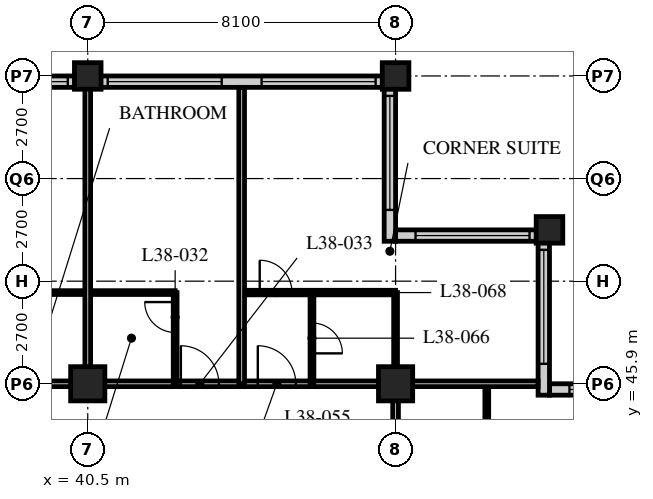
"""IFC4 building model, lengths in metres.
Left out: names, types, materials, properties, quantities, classifications, styles, units other than length and angle.
Written with IfcOpenShell. Run it as: python <this file> out.ifc"""

import sys

from ifc_helpers import new_model, si_unit, direction, frame, frame_2d, origin, origin_2d, place, context, subcontext, project, spatial, rectangle, hollow_rectangle, extrude, element, fill, save


model = new_model("IFC4")
c1 = context("Model", 3, precision=1e-05, world=origin(), true_north=direction((0.0, 1.0)))
c2 = subcontext(c1, "Body", "Model", "MODEL_VIEW")
j1 = project(units=[si_unit("LENGTHUNIT", "METRE"), si_unit("PLANEANGLEUNIT", "RADIAN")], contexts=[c1])
p1 = place(None, origin())
s1 = spatial("IfcSite", under=j1, at=p1, CompositionType="ELEMENT")
p2 = place(p1, origin())
s2 = spatial("IfcBuilding", under=s1, at=p2, CompositionType="ELEMENT")
p3 = place(p2, frame((0.0, 0.0, 147.6)))
s3 = spatial("IfcBuildingStorey", under=s2, at=p3, CompositionType="ELEMENT", Elevation=147.6)
p4 = place(p3, frame((40.5, 45.9, 0.0), z_axis=(0.0, 0.0, 1.0), x_axis=(1.0, 0.0, 0.0)))
e1 = element("IfcColumn", 1, at=p4, inside=s3, PredefinedType="COLUMN", context=c2, shape_type="SweptSolid", body=[
    extrude(hollow_rectangle(XDim=0.9, YDim=0.9, WallThickness=0.1, at=origin_2d()), origin(), (0.0, 0.0, 1.0), 3.4),
])
p5 = place(p3, frame((40.5, 54.0, 0.0), z_axis=(0.0, 0.0, 1.0), x_axis=(1.0, 0.0, 0.0)))
e2 = element("IfcColumn", 2, at=p5, inside=s3, PredefinedType="COLUMN", context=c2, shape_type="SweptSolid", body=[
    extrude(hollow_rectangle(XDim=0.7, YDim=0.7, WallThickness=0.07, at=origin_2d()), origin(), (0.0, 0.0, 1.0), 3.4),
])
p6 = place(p3, frame((48.6, 45.9, 0.0), z_axis=(0.0, 0.0, 1.0), x_axis=(1.0, 0.0, 0.0)))
e3 = element("IfcColumn", 3, at=p6, inside=s3, PredefinedType="COLUMN", context=c2, shape_type="SweptSolid", body=[
    extrude(hollow_rectangle(XDim=0.9, YDim=0.9, WallThickness=0.1, at=origin_2d()), origin(), (0.0, 0.0, 1.0), 3.4),
])
for number, where, z_axis, x_axis in (
    (4, (48.6, 54.0, 0.0), (0.0, 0.0, 1.0), (1.0, 0.0, 0.0)),
    (5, (52.65, 49.95, 0.0), (0.0, 0.0, 1.0), (1.0, 0.0, 0.0)),
):
    element("IfcColumn", number, at=place(p3, frame(where, z_axis=z_axis, x_axis=x_axis)), inside=s3, PredefinedType="COLUMN", context=c2, shape_type="SweptSolid", body=[
        extrude(hollow_rectangle(XDim=0.7, YDim=0.7, WallThickness=0.07, at=origin_2d()), origin(), (0.0, 0.0, 1.0), 3.4),
    ])
p7 = place(p3, frame((56.4, 45.75, 0.0), z_axis=(0.0, 0.0, 1.0), x_axis=(-1.0, 0.0, 0.0)))
e6 = element("IfcWall", 6, at=p7, inside=s3, PredefinedType="SOLIDWALL", context=c2, shape_type="SweptSolid", body=[
    extrude(rectangle(XDim=3.75, YDim=0.3, at=frame_2d((1.875, 0.0))), origin(), (0.0, 0.0, 1.0), 3.19),
])
p8 = place(p7, frame((0.225, 0.0, 0.9)))
e7 = element("IfcOpeningElement", 7, at=p8, cuts=e6, PredefinedType="OPENING", context=c2, shape_type="SweptSolid", body=[
    extrude(rectangle(XDim=3.0, YDim=1.4, at=frame_2d((1.5, 0.7))), frame((0.0, 0.16, 0.0), z_axis=(0.0, -1.0, 0.0), x_axis=(1.0, 0.0, 0.0)), (0.0, 0.0, 1.0), 0.32),
])
p9 = place(p3, frame((52.5, 45.6, 0.0), z_axis=(0.0, 0.0, 1.0), x_axis=(0.0, 1.0, 0.0)))
e8 = element("IfcWall", 8, at=p9, inside=s3, PredefinedType="SOLIDWALL", context=c2, shape_type="SweptSolid", body=[
    extrude(rectangle(XDim=4.35, YDim=0.3, at=frame_2d((2.175, 0.0))), origin(), (0.0, 0.0, 1.0), 3.19),
])
p10 = place(p9, frame((0.825, 0.0, 0.9)))
e9 = element("IfcOpeningElement", 9, at=p10, cuts=e8, PredefinedType="OPENING", context=c2, shape_type="SweptSolid", body=[
    extrude(rectangle(XDim=3.0, YDim=1.4, at=frame_2d((1.5, 0.7))), frame((0.0, 0.16, 0.0), z_axis=(0.0, -1.0, 0.0), x_axis=(1.0, 0.0, 0.0)), (0.0, 0.0, 1.0), 0.32),
])
p11 = place(p3, frame((52.35, 49.8, 0.0), z_axis=(0.0, 0.0, 1.0), x_axis=(-1.0, 0.0, 0.0)))
e10 = element("IfcWall", 10, at=p11, inside=s3, PredefinedType="SOLIDWALL", context=c2, shape_type="SweptSolid", body=[
    extrude(rectangle(XDim=3.75, YDim=0.3, at=frame_2d((1.875, 0.0))), origin(), (0.0, 0.0, 1.0), 3.19),
])
p12 = place(p11, frame((0.225, 0.0, 0.9)))
e11 = element("IfcOpeningElement", 11, at=p12, cuts=e10, PredefinedType="OPENING", context=c2, shape_type="SweptSolid", body=[
    extrude(rectangle(XDim=3.0, YDim=1.4, at=frame_2d((1.5, 0.7))), frame((0.0, 0.16, 0.0), z_axis=(0.0, -1.0, 0.0), x_axis=(1.0, 0.0, 0.0)), (0.0, 0.0, 1.0), 0.32),
])
p13 = place(p3, frame((48.45, 49.65, 0.0), z_axis=(0.0, 0.0, 1.0), x_axis=(0.0, 1.0, 0.0)))
e12 = element("IfcWall", 12, at=p13, inside=s3, PredefinedType="SOLIDWALL", context=c2, shape_type="SweptSolid", body=[
    extrude(rectangle(XDim=4.35, YDim=0.3, at=frame_2d((2.175, 0.0))), origin(), (0.0, 0.0, 1.0), 3.19),
])
p14 = place(p13, frame((0.825, 0.0, 0.9)))
e13 = element("IfcOpeningElement", 13, at=p14, cuts=e12, PredefinedType="OPENING", context=c2, shape_type="SweptSolid", body=[
    extrude(rectangle(XDim=3.0, YDim=1.4, at=frame_2d((1.5, 0.7))), frame((0.0, 0.16, 0.0), z_axis=(0.0, -1.0, 0.0), x_axis=(1.0, 0.0, 0.0)), (0.0, 0.0, 1.0), 0.32),
])
p15 = place(p3, frame((48.3, 53.85, 0.0), z_axis=(0.0, 0.0, 1.0), x_axis=(-1.0, 0.0, 0.0)))
e14 = element("IfcWall", 14, at=p15, inside=s3, PredefinedType="SOLIDWALL", context=c2, shape_type="SweptSolid", body=[
    extrude(rectangle(XDim=40.2, YDim=0.3, at=frame_2d((20.1, 0.0))), origin(), (0.0, 0.0, 1.0), 3.19),
])
p16 = place(p15, frame((0.225, 0.0, 0.9)))
e15 = element("IfcOpeningElement", 15, at=p16, cuts=e14, PredefinedType="OPENING", context=c2, shape_type="SweptSolid", body=[
    extrude(rectangle(XDim=3.0, YDim=1.4, at=frame_2d((1.5, 0.7))), frame((0.0, 0.16, 0.0), z_axis=(0.0, -1.0, 0.0), x_axis=(1.0, 0.0, 0.0)), (0.0, 0.0, 1.0), 0.32),
])
p17 = place(p15, frame((4.275, 0.0, 0.9)))
e16 = element("IfcOpeningElement", 16, at=p17, cuts=e14, PredefinedType="OPENING", context=c2, shape_type="SweptSolid", body=[
    extrude(rectangle(XDim=3.0, YDim=1.4, at=frame_2d((1.5, 0.7))), frame((0.0, 0.16, 0.0), z_axis=(0.0, -1.0, 0.0), x_axis=(1.0, 0.0, 0.0)), (0.0, 0.0, 1.0), 0.32),
])
p18 = place(p15, frame((8.325, 0.0, 0.9)))
e17 = element("IfcOpeningElement", 17, at=p18, cuts=e14, PredefinedType="OPENING", context=c2, shape_type="SweptSolid", body=[
    extrude(rectangle(XDim=3.0, YDim=1.4, at=frame_2d((1.5, 0.7))), frame((0.0, 0.16, 0.0), z_axis=(0.0, -1.0, 0.0), x_axis=(1.0, 0.0, 0.0)), (0.0, 0.0, 1.0), 0.32),
])
p19 = place(p15, frame((12.375, 0.0, 0.9)))
e18 = element("IfcOpeningElement", 18, at=p19, cuts=e14, PredefinedType="OPENING", context=c2, shape_type="SweptSolid", body=[
    extrude(rectangle(XDim=3.0, YDim=1.4, at=frame_2d((1.5, 0.7))), frame((0.0, 0.16, 0.0), z_axis=(0.0, -1.0, 0.0), x_axis=(1.0, 0.0, 0.0)), (0.0, 0.0, 1.0), 0.32),
])
p20 = place(p15, frame((16.425, 0.0, 0.9)))
e19 = element("IfcOpeningElement", 19, at=p20, cuts=e14, PredefinedType="OPENING", context=c2, shape_type="SweptSolid", body=[
    extrude(rectangle(XDim=3.0, YDim=1.4, at=frame_2d((1.5, 0.7))), frame((0.0, 0.16, 0.0), z_axis=(0.0, -1.0, 0.0), x_axis=(1.0, 0.0, 0.0)), (0.0, 0.0, 1.0), 0.32),
])
p21 = place(p15, frame((20.475, 0.0, 0.9)))
e20 = element("IfcOpeningElement", 20, at=p21, cuts=e14, PredefinedType="OPENING", context=c2, shape_type="SweptSolid", body=[
    extrude(rectangle(XDim=3.0, YDim=1.4, at=frame_2d((1.5, 0.7))), frame((0.0, 0.16, 0.0), z_axis=(0.0, -1.0, 0.0), x_axis=(1.0, 0.0, 0.0)), (0.0, 0.0, 1.0), 0.32),
])
p22 = place(p15, frame((24.525, 0.0, 0.9)))
e21 = element("IfcOpeningElement", 21, at=p22, cuts=e14, PredefinedType="OPENING", context=c2, shape_type="SweptSolid", body=[
    extrude(rectangle(XDim=3.0, YDim=1.4, at=frame_2d((1.5, 0.7))), frame((0.0, 0.16, 0.0), z_axis=(0.0, -1.0, 0.0), x_axis=(1.0, 0.0, 0.0)), (0.0, 0.0, 1.0), 0.32),
])
p23 = place(p15, frame((28.575, 0.0, 0.9)))
e22 = element("IfcOpeningElement", 22, at=p23, cuts=e14, PredefinedType="OPENING", context=c2, shape_type="SweptSolid", body=[
    extrude(rectangle(XDim=3.0, YDim=1.4, at=frame_2d((1.5, 0.7))), frame((0.0, 0.16, 0.0), z_axis=(0.0, -1.0, 0.0), x_axis=(1.0, 0.0, 0.0)), (0.0, 0.0, 1.0), 0.32),
])
p24 = place(p15, frame((32.625, 0.0, 0.9)))
e23 = element("IfcOpeningElement", 23, at=p24, cuts=e14, PredefinedType="OPENING", context=c2, shape_type="SweptSolid", body=[
    extrude(rectangle(XDim=3.0, YDim=1.4, at=frame_2d((1.5, 0.7))), frame((0.0, 0.16, 0.0), z_axis=(0.0, -1.0, 0.0), x_axis=(1.0, 0.0, 0.0)), (0.0, 0.0, 1.0), 0.32),
])
p25 = place(p15, frame((36.675, 0.0, 0.9)))
e24 = element("IfcOpeningElement", 24, at=p25, cuts=e14, PredefinedType="OPENING", context=c2, shape_type="SweptSolid", body=[
    extrude(rectangle(XDim=3.0, YDim=1.4, at=frame_2d((1.5, 0.7))), frame((0.0, 0.16, 0.0), z_axis=(0.0, -1.0, 0.0), x_axis=(1.0, 0.0, 0.0)), (0.0, 0.0, 1.0), 0.32),
])
p26 = place(p3, frame((12.15, 45.9, 0.0), z_axis=(0.0, 0.0, 1.0), x_axis=(1.0, 0.0, 0.0)))
e25 = element("IfcWall", 25, at=p26, inside=s3, PredefinedType="PARTITIONING", context=c2, shape_type="SweptSolid", body=[
    extrude(rectangle(XDim=36.45, YDim=0.15, at=frame_2d((18.225, 0.0))), origin(), (0.0, 0.0, 1.0), 2.42),
])
p27 = place(p26, frame((9.225, 0.0, 0.0)))
e26 = element("IfcOpeningElement", 26, at=p27, cuts=e25, PredefinedType="OPENING", context=c2, shape_type="SweptSolid", body=[
    extrude(rectangle(XDim=1.8, YDim=2.4, at=frame_2d((0.9, 1.2))), frame((0.0, 0.085, 0.0), z_axis=(0.0, -1.0, 0.0), x_axis=(1.0, 0.0, 0.0)), (0.0, 0.0, 1.0), 0.17),
])
p28 = place(p26, frame((21.65, 0.0, 0.0)))
e27 = element("IfcOpeningElement", 27, at=p28, cuts=e25, PredefinedType="OPENING", context=c2, shape_type="SweptSolid", body=[
    extrude(rectangle(XDim=1.0, YDim=2.1, at=frame_2d((0.5, 1.05))), frame((0.0, 0.085, 0.0), z_axis=(0.0, -1.0, 0.0), x_axis=(1.0, 0.0, 0.0)), (0.0, 0.0, 1.0), 0.17),
])
p29 = place(p26, frame((24.9, 0.0, 0.0)))
e28 = element("IfcOpeningElement", 28, at=p29, cuts=e25, PredefinedType="OPENING", context=c2, shape_type="SweptSolid", body=[
    extrude(rectangle(XDim=1.0, YDim=2.1, at=frame_2d((0.5, 1.05))), frame((0.0, 0.085, 0.0), z_axis=(0.0, -1.0, 0.0), x_axis=(1.0, 0.0, 0.0)), (0.0, 0.0, 1.0), 0.17),
])
p30 = place(p26, frame((30.8, 0.0, 0.0)))
e29 = element("IfcOpeningElement", 29, at=p30, cuts=e25, PredefinedType="OPENING", context=c2, shape_type="SweptSolid", body=[
    extrude(rectangle(XDim=1.0, YDim=2.1, at=frame_2d((0.5, 1.05))), frame((0.0, 0.085, 0.0), z_axis=(0.0, -1.0, 0.0), x_axis=(1.0, 0.0, 0.0)), (0.0, 0.0, 1.0), 0.17),
])
p31 = place(p26, frame((32.825, 0.0, 0.0)))
e30 = element("IfcOpeningElement", 30, at=p31, cuts=e25, PredefinedType="OPENING", context=c2, shape_type="SweptSolid", body=[
    extrude(rectangle(XDim=1.0, YDim=2.1, at=frame_2d((0.5, 1.05))), frame((0.0, 0.085, 0.0), z_axis=(0.0, -1.0, 0.0), x_axis=(1.0, 0.0, 0.0)), (0.0, 0.0, 1.0), 0.17),
])
p32 = place(p26, frame((1.525, 0.0, 0.0)))
e31 = element("IfcOpeningElement", 31, at=p32, cuts=e25, PredefinedType="OPENING", context=c2, shape_type="SweptSolid", body=[
    extrude(rectangle(XDim=1.0, YDim=2.1, at=frame_2d((0.5, 1.05))), frame((0.0, 0.085, 0.0), z_axis=(0.0, -1.0, 0.0), x_axis=(1.0, 0.0, 0.0)), (0.0, 0.0, 1.0), 0.17),
])
p33 = place(p3, frame((48.6, 21.6, 0.0), z_axis=(0.0, 0.0, 1.0), x_axis=(0.0, 1.0, 0.0)))
e32 = element("IfcWall", 32, at=p33, inside=s3, PredefinedType="PARTITIONING", context=c2, shape_type="SweptSolid", body=[
    extrude(rectangle(XDim=24.3, YDim=0.15, at=frame_2d((12.15, 0.0))), origin(), (0.0, 0.0, 1.0), 2.42),
])
p34 = place(p33, frame((2.75, 0.0, 0.0)))
e33 = element("IfcOpeningElement", 33, at=p34, cuts=e32, PredefinedType="OPENING", context=c2, shape_type="SweptSolid", body=[
    extrude(rectangle(XDim=1.0, YDim=2.1, at=frame_2d((0.5, 1.05))), frame((0.0, 0.085, 0.0), z_axis=(0.0, -1.0, 0.0), x_axis=(1.0, 0.0, 0.0)), (0.0, 0.0, 1.0), 0.17),
])
p35 = place(p33, frame((4.65, 0.0, 0.0)))
e34 = element("IfcOpeningElement", 34, at=p35, cuts=e32, PredefinedType="OPENING", context=c2, shape_type="SweptSolid", body=[
    extrude(rectangle(XDim=1.0, YDim=2.1, at=frame_2d((0.5, 1.05))), frame((0.0, 0.085, 0.0), z_axis=(0.0, -1.0, 0.0), x_axis=(1.0, 0.0, 0.0)), (0.0, 0.0, 1.0), 0.17),
])
p36 = place(p33, frame((13.675, 0.0, 0.0)))
e35 = element("IfcOpeningElement", 35, at=p36, cuts=e32, PredefinedType="OPENING", context=c2, shape_type="SweptSolid", body=[
    extrude(rectangle(XDim=1.0, YDim=2.1, at=frame_2d((0.5, 1.05))), frame((0.0, 0.085, 0.0), z_axis=(0.0, -1.0, 0.0), x_axis=(1.0, 0.0, 0.0)), (0.0, 0.0, 1.0), 0.17),
])
p37 = place(p33, frame((20.85, 0.0, 0.0)))
e36 = element("IfcOpeningElement", 36, at=p37, cuts=e32, PredefinedType="OPENING", context=c2, shape_type="SweptSolid", body=[
    extrude(rectangle(XDim=1.0, YDim=2.1, at=frame_2d((0.5, 1.05))), frame((0.0, 0.085, 0.0), z_axis=(0.0, -1.0, 0.0), x_axis=(1.0, 0.0, 0.0)), (0.0, 0.0, 1.0), 0.17),
])
p38 = place(p3, frame((38.2, 48.3, 0.0), z_axis=(0.0, 0.0, 1.0), x_axis=(1.0, 0.0, 0.0)))
e37 = element("IfcWall", 37, at=p38, inside=s3, PredefinedType="PARTITIONING", context=c2, shape_type="SweptSolid", body=[
    extrude(rectangle(XDim=4.6, YDim=0.1, at=frame_2d((2.3, 0.0))), origin(), (0.0, 0.0, 1.0), 3.19),
])
p39 = place(p3, frame((40.5, 45.9, 0.0), z_axis=(0.0, 0.0, 1.0), x_axis=(0.0, 1.0, 0.0)))
e38 = element("IfcWall", 38, at=p39, inside=s3, PredefinedType="PARTITIONING", context=c2, shape_type="SweptSolid", body=[
    extrude(rectangle(XDim=7.8, YDim=0.15, at=frame_2d((3.9, 0.0))), origin(), (0.0, 0.0, 1.0), 2.42),
])
p40 = place(p3, frame((42.8, 45.9, 0.0), z_axis=(0.0, 0.0, 1.0), x_axis=(0.0, 1.0, 0.0)))
e39 = element("IfcWall", 39, at=p40, inside=s3, PredefinedType="PARTITIONING", context=c2, shape_type="SweptSolid", body=[
    extrude(rectangle(XDim=2.4, YDim=0.1, at=frame_2d((1.2, 0.0))), origin(), (0.0, 0.0, 1.0), 3.19),
])
p41 = place(p40, frame((1.35, 0.0, 0.0)))
e40 = element("IfcOpeningElement", 40, at=p41, cuts=e39, PredefinedType="OPENING", context=c2, shape_type="SweptSolid", body=[
    extrude(rectangle(XDim=0.8, YDim=2.1, at=frame_2d((0.4, 1.05))), frame((0.0, 0.06, 0.0), z_axis=(0.0, -1.0, 0.0), x_axis=(1.0, 0.0, 0.0)), (0.0, 0.0, 1.0), 0.12),
])
p42 = place(p3, frame((51.0, 43.6, 0.0), z_axis=(0.0, 0.0, 1.0), x_axis=(0.0, 1.0, 0.0)))
e41 = element("IfcWall", 41, at=p42, inside=s3, PredefinedType="PARTITIONING", context=c2, shape_type="SweptSolid", body=[
    extrude(rectangle(XDim=2.3, YDim=0.1, at=frame_2d((1.15, 0.0))), origin(), (0.0, 0.0, 1.0), 3.19),
])
p43 = place(p3, frame((44.55, 48.3, 0.0), z_axis=(0.0, 0.0, 1.0), x_axis=(1.0, 0.0, 0.0)))
e42 = element("IfcWall", 42, at=p43, inside=s3, PredefinedType="PARTITIONING", context=c2, shape_type="SweptSolid", body=[
    extrude(rectangle(XDim=4.05, YDim=0.12, at=frame_2d((2.025, 0.0))), origin(), (0.0, 0.0, 1.0), 3.19),
])
p44 = place(p43, frame((0.475, 0.0, 0.0)))
e43 = element("IfcOpeningElement", 43, at=p44, cuts=e42, PredefinedType="OPENING", context=c2, shape_type="SweptSolid", body=[
    extrude(rectangle(XDim=0.85, YDim=2.1, at=frame_2d((0.425, 1.05))), frame((0.0, 0.07, 0.0), z_axis=(0.0, -1.0, 0.0), x_axis=(1.0, 0.0, 0.0)), (0.0, 0.0, 1.0), 0.14),
])
p45 = place(p3, frame((46.4, 45.9, 0.0), z_axis=(0.0, 0.0, 1.0), x_axis=(0.0, 1.0, 0.0)))
e44 = element("IfcWall", 44, at=p45, inside=s3, PredefinedType="PARTITIONING", context=c2, shape_type="SweptSolid", body=[
    extrude(rectangle(XDim=2.4, YDim=0.1, at=frame_2d((1.2, 0.0))), origin(), (0.0, 0.0, 1.0), 3.19),
])
p46 = place(p45, frame((0.8, 0.0, 0.0)))
e45 = element("IfcOpeningElement", 45, at=p46, cuts=e44, PredefinedType="OPENING", context=c2, shape_type="SweptSolid", body=[
    extrude(rectangle(XDim=0.8, YDim=2.1, at=frame_2d((0.4, 1.05))), frame((0.0, 0.06, 0.0), z_axis=(0.0, -1.0, 0.0), x_axis=(1.0, 0.0, 0.0)), (0.0, 0.0, 1.0), 0.12),
])
p47 = place(p3, frame((48.6, 45.9, 0.0), z_axis=(0.0, 0.0, 1.0), x_axis=(0.0, 1.0, 0.0)))
e46 = element("IfcWall", 46, at=p47, inside=s3, PredefinedType="PARTITIONING", context=c2, shape_type="SweptSolid", body=[
    extrude(rectangle(XDim=2.4, YDim=0.1, at=frame_2d((1.2, 0.0))), origin(), (0.0, 0.0, 1.0), 2.42),
])
p48 = place(p3, frame((48.6, 45.9, 0.0), z_axis=(0.0, 0.0, 1.0), x_axis=(1.0, 0.0, 0.0)))
e47 = element("IfcWall", 47, at=p48, inside=s3, PredefinedType="PARTITIONING", context=c2, shape_type="SweptSolid", body=[
    extrude(rectangle(XDim=3.75, YDim=0.15, at=frame_2d((1.875, 0.0))), origin(), (0.0, 0.0, 1.0), 2.42),
])
p49 = place(p3, frame((44.55, 45.9, 0.0), z_axis=(0.0, 0.0, 1.0), x_axis=(0.0, 1.0, 0.0)))
e48 = element("IfcWall", 48, at=p49, inside=s3, PredefinedType="PARTITIONING", context=c2, shape_type="SweptSolid", body=[
    extrude(rectangle(XDim=7.8, YDim=0.15, at=frame_2d((3.9, 0.0))), origin(), (0.0, 0.0, 1.0), 3.19),
])
p50 = place(p8, origin())
e49 = element("IfcWindow", 49, at=p50, inside=s3, PartitioningType="SINGLE_PANEL", PredefinedType="WINDOW", context=c2, shape_type="SweptSolid", body=[
    extrude(rectangle(XDim=3.0, YDim=1.4, at=frame_2d((1.5, 0.7))), frame((0.0, 0.03, 0.0), z_axis=(0.0, -1.0, 0.0), x_axis=(1.0, 0.0, 0.0)), (0.0, 0.0, 1.0), 0.06),
])
fill(e7, e49)
p51 = place(p10, origin())
e50 = element("IfcWindow", 50, at=p51, inside=s3, PartitioningType="SINGLE_PANEL", PredefinedType="WINDOW", context=c2, shape_type="SweptSolid", body=[
    extrude(rectangle(XDim=3.0, YDim=1.4, at=frame_2d((1.5, 0.7))), frame((0.0, 0.03, 0.0), z_axis=(0.0, -1.0, 0.0), x_axis=(1.0, 0.0, 0.0)), (0.0, 0.0, 1.0), 0.06),
])
fill(e9, e50)
p52 = place(p12, origin())
e51 = element("IfcWindow", 51, at=p52, inside=s3, PartitioningType="SINGLE_PANEL", PredefinedType="WINDOW", context=c2, shape_type="SweptSolid", body=[
    extrude(rectangle(XDim=3.0, YDim=1.4, at=frame_2d((1.5, 0.7))), frame((0.0, 0.03, 0.0), z_axis=(0.0, -1.0, 0.0), x_axis=(1.0, 0.0, 0.0)), (0.0, 0.0, 1.0), 0.06),
])
fill(e11, e51)
p53 = place(p14, origin())
e52 = element("IfcWindow", 52, at=p53, inside=s3, PartitioningType="SINGLE_PANEL", PredefinedType="WINDOW", context=c2, shape_type="SweptSolid", body=[
    extrude(rectangle(XDim=3.0, YDim=1.4, at=frame_2d((1.5, 0.7))), frame((0.0, 0.03, 0.0), z_axis=(0.0, -1.0, 0.0), x_axis=(1.0, 0.0, 0.0)), (0.0, 0.0, 1.0), 0.06),
])
fill(e13, e52)
p54 = place(p16, origin())
e53 = element("IfcWindow", 53, at=p54, inside=s3, PartitioningType="SINGLE_PANEL", PredefinedType="WINDOW", context=c2, shape_type="SweptSolid", body=[
    extrude(rectangle(XDim=3.0, YDim=1.4, at=frame_2d((1.5, 0.7))), frame((0.0, 0.03, 0.0), z_axis=(0.0, -1.0, 0.0), x_axis=(1.0, 0.0, 0.0)), (0.0, 0.0, 1.0), 0.06),
])
fill(e15, e53)
p55 = place(p17, origin())
e54 = element("IfcWindow", 54, at=p55, inside=s3, PartitioningType="SINGLE_PANEL", PredefinedType="WINDOW", context=c2, shape_type="SweptSolid", body=[
    extrude(rectangle(XDim=3.0, YDim=1.4, at=frame_2d((1.5, 0.7))), frame((0.0, 0.03, 0.0), z_axis=(0.0, -1.0, 0.0), x_axis=(1.0, 0.0, 0.0)), (0.0, 0.0, 1.0), 0.06),
])
fill(e16, e54)
p56 = place(p18, origin())
e55 = element("IfcWindow", 55, at=p56, inside=s3, PartitioningType="SINGLE_PANEL", PredefinedType="WINDOW", context=c2, shape_type="SweptSolid", body=[
    extrude(rectangle(XDim=3.0, YDim=1.4, at=frame_2d((1.5, 0.7))), frame((0.0, 0.03, 0.0), z_axis=(0.0, -1.0, 0.0), x_axis=(1.0, 0.0, 0.0)), (0.0, 0.0, 1.0), 0.06),
])
fill(e17, e55)
p57 = place(p41, origin())
e56 = element("IfcDoor", 56, at=p57, inside=s3, OperationType="SINGLE_SWING_RIGHT", PredefinedType="DOOR", context=c2, shape_type="SweptSolid", body=[
    extrude(rectangle(XDim=0.8, YDim=2.1, at=frame_2d((0.4, 1.05))), frame((0.0, 0.025, 0.0), z_axis=(0.0, -1.0, 0.0), x_axis=(1.0, 0.0, 0.0)), (0.0, 0.0, 1.0), 0.05),
])
fill(e40, e56)
p58 = place(p30, origin())
e57 = element("IfcDoor", 57, at=p58, inside=s3, OperationType="SINGLE_SWING_LEFT", PredefinedType="DOOR", context=c2, shape_type="SweptSolid", body=[
    extrude(rectangle(XDim=1.0, YDim=2.1, at=frame_2d((0.5, 1.05))), frame((0.0, 0.025, 0.0), z_axis=(0.0, -1.0, 0.0), x_axis=(1.0, 0.0, 0.0)), (0.0, 0.0, 1.0), 0.05),
])
fill(e29, e57)
p59 = place(p46, origin())
e58 = element("IfcDoor", 58, at=p59, inside=s3, OperationType="SINGLE_SWING_RIGHT", PredefinedType="DOOR", context=c2, shape_type="SweptSolid", body=[
    extrude(rectangle(XDim=0.8, YDim=2.1, at=frame_2d((0.4, 1.05))), frame((0.0, 0.025, 0.0), z_axis=(0.0, -1.0, 0.0), x_axis=(1.0, 0.0, 0.0)), (0.0, 0.0, 1.0), 0.05),
])
fill(e45, e58)
p60 = place(p31, origin())
e59 = element("IfcDoor", 59, at=p60, inside=s3, OperationType="SINGLE_SWING_LEFT", PredefinedType="DOOR", context=c2, shape_type="SweptSolid", body=[
    extrude(rectangle(XDim=1.0, YDim=2.1, at=frame_2d((0.5, 1.05))), frame((0.0, 0.025, 0.0), z_axis=(0.0, -1.0, 0.0), x_axis=(1.0, 0.0, 0.0)), (0.0, 0.0, 1.0), 0.05),
])
fill(e30, e59)
p61 = place(p44, origin())
e60 = element("IfcDoor", 60, at=p61, inside=s3, OperationType="SINGLE_SWING_LEFT", PredefinedType="DOOR", context=c2, shape_type="SweptSolid", body=[
    extrude(rectangle(XDim=0.85, YDim=2.1, at=frame_2d((0.425, 1.05))), frame((0.0, 0.025, 0.0), z_axis=(0.0, -1.0, 0.0), x_axis=(1.0, 0.0, 0.0)), (0.0, 0.0, 1.0), 0.05),
])
fill(e43, e60)
save(model, sys.argv[1])
